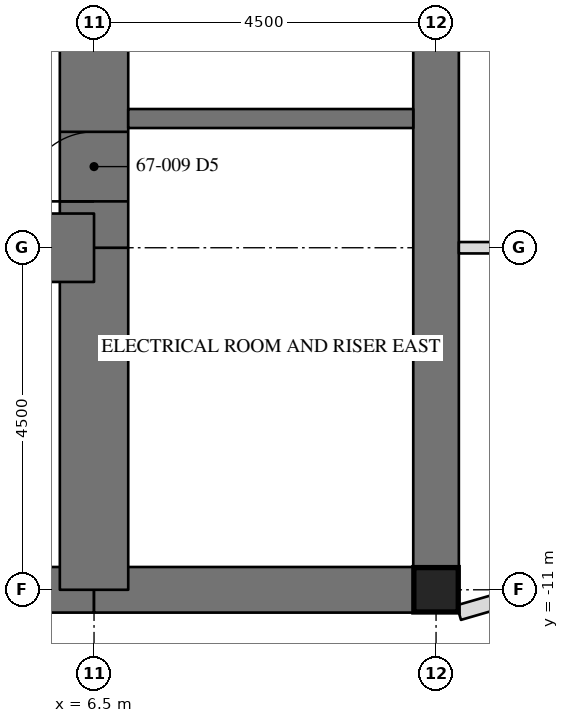
"""IFC4 building model, lengths in metres.
Left out: names, types, materials, properties, quantities, classifications, styles, units other than length and angle.
Written with IfcOpenShell. Run it as: python <this file> out.ifc"""

import sys

from ifc_helpers import new_model, si_unit, direction, frame, frame_2d, origin, origin_2d, place, context, subcontext, project, spatial, rectangle, hollow_rectangle, extrude, element, fill, save


model = new_model("IFC4")
c1 = context("Model", 3, precision=1e-05, world=origin(), true_north=direction((0.0, 1.0)))
c2 = subcontext(c1, "Body", "Model", "MODEL_VIEW")
j1 = project(units=[si_unit("LENGTHUNIT", "METRE"), si_unit("PLANEANGLEUNIT", "RADIAN")], contexts=[c1])
p1 = place(None, origin())
s1 = spatial("IfcSite", under=j1, at=p1, CompositionType="ELEMENT")
p2 = place(p1, origin())
s2 = spatial("IfcBuilding", under=s1, at=p2, CompositionType="ELEMENT")
p3 = place(p2, frame((0.0, 0.0, 274.0)))
s3 = spatial("IfcBuildingStorey", under=s2, at=p3, CompositionType="ELEMENT", Elevation=274.0)
p4 = place(p3, frame((11.0, -11.0, 0.0), z_axis=(0.0, 0.0, 1.0), x_axis=(0.0, 1.0, 0.0)))
e1 = element("IfcWall", 1, at=p4, inside=s3, PredefinedType="SHEAR", context=c2, shape_type="SweptSolid", body=[
    extrude(rectangle(XDim=22.0, YDim=0.6, at=frame_2d((11.0, 0.0))), origin(), (0.0, 0.0, 1.0), 3.6),
])
p5 = place(p4, frame((15.393, 0.0, 0.0)))
e2 = element("IfcOpeningElement", 2, at=p5, cuts=e1, PredefinedType="OPENING", context=c2, shape_type="SweptSolid", body=[
    extrude(rectangle(XDim=0.915, YDim=2.134, at=frame_2d((0.458, 1.067))), frame((0.0, 0.31, 0.0), z_axis=(0.0, -1.0, 0.0), x_axis=(1.0, 0.0, 0.0)), (0.0, 0.0, 1.0), 0.62),
])
p6 = place(p3, frame((-6.5, -11.0, 0.0), z_axis=(0.0, 0.0, 1.0), x_axis=(1.0, 0.0, 0.0)))
e3 = element("IfcWall", 3, at=p6, inside=s3, PredefinedType="SHEAR", context=c2, shape_type="SweptSolid", body=[
    extrude(rectangle(XDim=13.0, YDim=0.6, at=frame_2d((6.5, 0.0))), origin(), (0.0, 0.0, 1.0), 3.6),
])
p7 = place(p6, frame((6.0, 0.0, 0.0)))
e4 = element("IfcOpeningElement", 4, at=p7, cuts=e3, PredefinedType="OPENING", context=c2, shape_type="SweptSolid", body=[
    extrude(rectangle(XDim=1.0, YDim=2.134, at=frame_2d((0.5, 1.067))), frame((0.0, 0.31, 0.0), z_axis=(0.0, -1.0, 0.0), x_axis=(1.0, 0.0, 0.0)), (0.0, 0.0, 1.0), 0.62),
])
p8 = place(p3, frame((6.5, -11.0, 0.0), z_axis=(0.0, 0.0, 1.0), x_axis=(1.0, 0.0, 0.0)))
e5 = element("IfcWall", 5, at=p8, inside=s3, PredefinedType="SHEAR", context=c2, shape_type="SweptSolid", body=[
    extrude(rectangle(XDim=4.5, YDim=0.6, at=frame_2d((2.25, 0.0))), origin(), (0.0, 0.0, 1.0), 3.6),
])
p9 = place(p3, frame((6.5, -11.0, 0.0), z_axis=(0.0, 0.0, 1.0), x_axis=(0.0, 1.0, 0.0)))
e6 = element("IfcWall", 6, at=p9, inside=s3, PredefinedType="SHEAR", context=c2, shape_type="SweptSolid", body=[
    extrude(rectangle(XDim=4.5, YDim=0.9, at=frame_2d((2.25, 0.0))), origin(), (0.0, 0.0, 1.0), 3.6),
])
p10 = place(p3, frame((6.5, -6.5, 0.0), z_axis=(0.0, 0.0, 1.0), x_axis=(0.0, 1.0, 0.0)))
e7 = element("IfcWall", 7, at=p10, inside=s3, PredefinedType="SHEAR", context=c2, shape_type="SweptSolid", body=[
    extrude(rectangle(XDim=13.0, YDim=0.9, at=frame_2d((6.5, 0.0))), origin(), (0.0, 0.0, 1.0), 3.6),
])
p11 = place(p10, frame((10.893, 0.0, 0.0)))
e8 = element("IfcOpeningElement", 8, at=p11, cuts=e7, PredefinedType="OPENING", context=c2, shape_type="SweptSolid", body=[
    extrude(rectangle(XDim=0.915, YDim=2.134, at=frame_2d((0.458, 1.067))), frame((0.0, 0.46, 0.0), z_axis=(0.0, -1.0, 0.0), x_axis=(1.0, 0.0, 0.0)), (0.0, 0.0, 1.0), 0.92),
])
p12 = place(p10, frame((0.61, 0.0, 0.0)))
e9 = element("IfcOpeningElement", 9, at=p12, cuts=e7, PredefinedType="OPENING", context=c2, shape_type="SweptSolid", body=[
    extrude(rectangle(XDim=0.915, YDim=2.134, at=frame_2d((0.458, 1.067))), frame((0.0, 0.46, 0.0), z_axis=(0.0, -1.0, 0.0), x_axis=(1.0, 0.0, 0.0)), (0.0, 0.0, 1.0), 0.92),
])
p13 = place(p3, frame((-6.5, -6.5, 0.0), z_axis=(0.0, 0.0, 1.0), x_axis=(1.0, 0.0, 0.0)))
e10 = element("IfcWall", 10, at=p13, inside=s3, PredefinedType="SHEAR", context=c2, shape_type="SweptSolid", body=[
    extrude(rectangle(XDim=13.0, YDim=0.9, at=frame_2d((6.5, 0.0))), origin(), (0.0, 0.0, 1.0), 3.6),
])
p14 = place(p13, frame((6.042, 0.0, 0.0)))
e11 = element("IfcOpeningElement", 11, at=p14, cuts=e10, PredefinedType="OPENING", context=c2, shape_type="SweptSolid", body=[
    extrude(rectangle(XDim=0.915, YDim=2.134, at=frame_2d((0.458, 1.067))), frame((0.0, 0.46, 0.0), z_axis=(0.0, -1.0, 0.0), x_axis=(1.0, 0.0, 0.0)), (0.0, 0.0, 1.0), 0.92),
])
p15 = place(p13, frame((1.917, 0.0, 0.0)))
e12 = element("IfcOpeningElement", 12, at=p15, cuts=e10, PredefinedType="OPENING", context=c2, shape_type="SweptSolid", body=[
    extrude(rectangle(XDim=0.915, YDim=2.134, at=frame_2d((0.458, 1.067))), frame((0.0, 0.46, 0.0), z_axis=(0.0, -1.0, 0.0), x_axis=(1.0, 0.0, 0.0)), (0.0, 0.0, 1.0), 0.92),
])
p16 = place(p13, frame((9.567, 0.0, 0.0)))
e13 = element("IfcOpeningElement", 13, at=p16, cuts=e10, PredefinedType="OPENING", context=c2, shape_type="SweptSolid", body=[
    extrude(rectangle(XDim=0.915, YDim=2.134, at=frame_2d((0.458, 1.067))), frame((0.0, 0.46, 0.0), z_axis=(0.0, -1.0, 0.0), x_axis=(1.0, 0.0, 0.0)), (0.0, 0.0, 1.0), 0.92),
])
p17 = place(p3, frame((11.0, -11.0, 0.0), z_axis=(0.0, 0.0, 1.0), x_axis=(1.0, 0.0, 0.0)))
e14 = element("IfcColumn", 14, at=p17, inside=s3, PredefinedType="COLUMN", context=c2, shape_type="SweptSolid", body=[
    extrude(hollow_rectangle(XDim=0.584, YDim=0.584, WallThickness=0.051, at=origin_2d()), origin(), (0.0, 0.0, 1.0), 3.6),
])
p18 = place(p3, frame((6.95, -4.8, 0.0), z_axis=(0.0, 0.0, 1.0), x_axis=(1.0, 0.0, 0.0)))
e15 = element("IfcWall", 15, at=p18, inside=s3, PredefinedType="SOLIDWALL", context=c2, shape_type="SweptSolid", body=[
    extrude(rectangle(XDim=3.75, YDim=0.25, at=frame_2d((1.875, 0.0))), origin(), (0.0, 0.0, 1.0), 3.41),
])
p19 = place(p3, frame((11.3, -11.3, 0.0), z_axis=(0.0, 0.0, 1.0), x_axis=(0.960552344683, 0.278099250491, 0.0)))
e16 = element("IfcWall", 16, at=p19, inside=s3, PredefinedType="PARTITIONING", context=c2, shape_type="SweptSolid", body=[
    extrude(rectangle(XDim=1.584, YDim=0.2, at=frame_2d((0.792, 0.0))), origin(), (0.0, 0.0, 1.0), 3.41),
])
p20 = place(p3, frame((11.3, -6.5, 0.0), z_axis=(0.0, 0.0, 1.0), x_axis=(1.0, 0.0, 0.0)))
e17 = element("IfcWall", 17, at=p20, inside=s3, PredefinedType="PARTITIONING", context=c2, shape_type="SweptSolid", body=[
    extrude(rectangle(XDim=5.615, YDim=0.15, at=frame_2d((2.808, 0.0))), origin(), (0.0, 0.0, 1.0), 2.966),
])
p21 = place(p20, frame((2.742, 0.0, 0.0)))
e18 = element("IfcOpeningElement", 18, at=p21, cuts=e17, PredefinedType="OPENING", context=c2, shape_type="SweptSolid", body=[
    extrude(rectangle(XDim=0.915, YDim=2.134, at=frame_2d((0.458, 1.067))), frame((0.0, 0.085, 0.0), z_axis=(0.0, -1.0, 0.0), x_axis=(1.0, 0.0, 0.0)), (0.0, 0.0, 1.0), 0.17),
])
p22 = place(p12, origin())
e19 = element("IfcDoor", 19, at=p22, inside=s3, OperationType="SINGLE_SWING_RIGHT", PredefinedType="DOOR", context=c2, shape_type="SweptSolid", body=[
    extrude(rectangle(XDim=0.915, YDim=2.134, at=frame_2d((0.458, 1.067))), frame((0.0, -0.375, 0.0), z_axis=(0.0, -1.0, 0.0), x_axis=(1.0, 0.0, 0.0)), (0.0, 0.0, 1.0), 0.05),
])
fill(e9, e19)
save(model, sys.argv[1])
